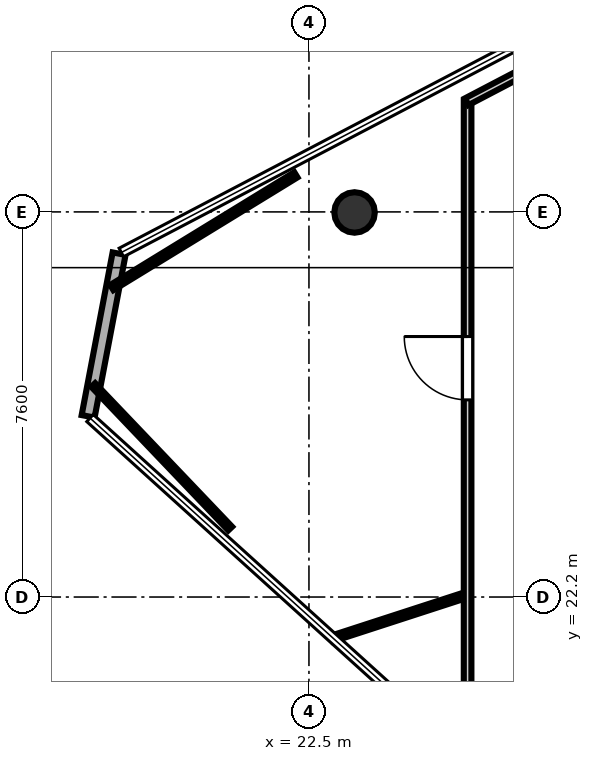
"""IFC4 building model, lengths in metres.
Left out: names, types, materials, properties, quantities, classifications, styles, units other than length and angle.
Written with IfcOpenShell. Run it as: python <this file> out.ifc"""

import sys

from ifc_helpers import new_model, si_unit, direction, frame, frame_2d, origin, origin_2d, place, context, subcontext, project, spatial, rectangle, hollow_circle, extrude, element, fill, save


model = new_model("IFC4")
c1 = context("Model", 3, precision=1e-05, world=origin(), true_north=direction((0.0, 1.0)))
c2 = subcontext(c1, "Body", "Model", "MODEL_VIEW")
j1 = project(units=[si_unit("LENGTHUNIT", "METRE"), si_unit("PLANEANGLEUNIT", "RADIAN")], contexts=[c1])
p1 = place(None, origin())
s1 = spatial("IfcSite", under=j1, at=p1, CompositionType="ELEMENT")
p2 = place(p1, origin())
s2 = spatial("IfcBuilding", under=s1, at=p2, CompositionType="ELEMENT")
p3 = place(p2, frame((0.0, 0.0, 351.8)))
s3 = spatial("IfcBuildingStorey", under=s2, at=p3, CompositionType="ELEMENT", Elevation=351.8)
p4 = place(p3, frame((23.4, 29.789, 0.0), z_axis=(0.0, 0.0, 1.0), x_axis=(1.0, 0.0, 0.0)))
e1 = element("IfcColumn", 1, at=p4, inside=s3, PredefinedType="COLUMN", context=c2, shape_type="SweptSolid", body=[
    extrude(hollow_circle(Radius=0.4, WallThickness=0.022, at=origin_2d()), origin(), (0.0, 0.0, 1.0), 4.5),
])
p5 = place(p3, frame((18.753, 28.976, 0.0), z_axis=(0.0, 0.0, 1.0), x_axis=(-0.186926716853, -0.982373860873, 0.0)))
e2 = element("IfcWall", 2, at=p5, inside=s3, PredefinedType="SOLIDWALL", context=c2, shape_type="SweptSolid", body=[
    extrude(rectangle(XDim=3.268, YDim=0.26, at=frame_2d((1.634, 0.0))), origin(), (0.0, 0.0, 1.0), 4.3),
])
p6 = place(p3, frame((25.631, 19.68, 0.0), z_axis=(0.0, 0.0, 1.0), x_axis=(0.0, 1.0, 0.0)))
e3 = element("IfcWall", 3, at=p6, inside=s3, PredefinedType="PARTITIONING", context=c2, shape_type="SweptSolid", body=[
    extrude(rectangle(XDim=12.322, YDim=0.15, at=frame_2d((6.161, 0.0))), origin(), (0.0, 0.0, 1.0), 2.82),
])
p7 = place(p6, frame((6.41, 0.0, 0.0)))
e4 = element("IfcOpeningElement", 4, at=p7, cuts=e3, PredefinedType="OPENING", context=c2, shape_type="SweptSolid", body=[
    extrude(rectangle(XDim=1.25, YDim=2.2, at=frame_2d((0.625, 1.1))), frame((0.0, 0.085, 0.0), z_axis=(0.0, -1.0, 0.0), x_axis=(1.0, 0.0, 0.0)), (0.0, 0.0, 1.0), 0.17),
])
p8 = place(p3, frame((25.615, 31.975, 0.0), z_axis=(0.0, 0.0, 1.0), x_axis=(0.885882957488, 0.463908811763, 0.0)))
e5 = element("IfcWall", 5, at=p8, inside=s3, PredefinedType="PARTITIONING", context=c2, shape_type="SweptSolid", body=[
    extrude(rectangle(XDim=2.323, YDim=0.15, at=frame_2d((1.162, 0.0))), origin(), (0.0, 0.0, 1.0), 2.82),
])
p9 = place(p3, frame((25.51, 22.21, 0.0), z_axis=(0.0, 0.0, 1.0), x_axis=(-0.951084194761, -0.308931795831, 0.0)))
e6 = element("IfcWall", 6, at=p9, inside=s3, PredefinedType="PARTITIONING", context=c2, shape_type="SweptSolid", body=[
    extrude(rectangle(XDim=2.684, YDim=0.12, at=frame_2d((1.342, 0.0))), origin(), (0.0, 0.0, 1.0), 2.82),
])
p10 = place(p3, frame((20.946, 23.551, 0.0), z_axis=(0.0, 0.0, 1.0), x_axis=(-0.690268168464, 0.723553630082, 0.0)))
e7 = element("IfcWall", 7, at=p10, inside=s3, PredefinedType="PARTITIONING", context=c2, shape_type="SweptSolid", body=[
    extrude(rectangle(XDim=3.917, YDim=0.105, at=frame_2d((1.958, 0.0))), origin(), (0.0, 0.0, 1.0), 2.82),
])
p11 = place(p3, frame((18.61, 28.307, 0.0), z_axis=(0.0, 0.0, 1.0), x_axis=(0.852738779299, 0.522337605654, 0.0)))
e8 = element("IfcWall", 8, at=p11, inside=s3, PredefinedType="PARTITIONING", context=c2, shape_type="SweptSolid", body=[
    extrude(rectangle(XDim=4.26, YDim=0.12, at=frame_2d((2.13, 0.0))), origin(), (0.0, 0.0, 1.0), 2.82),
])
p12 = place(p7, origin())
e9 = element("IfcDoor", 9, at=p12, inside=s3, OperationType="SINGLE_SWING_RIGHT", PredefinedType="DOOR", context=c2, shape_type="SweptSolid", body=[
    extrude(rectangle(XDim=1.25, YDim=2.2, at=frame_2d((0.625, 1.1))), frame((0.0, 0.025, 0.0), z_axis=(0.0, -1.0, 0.0), x_axis=(1.0, 0.0, 0.0)), (0.0, 0.0, 1.0), 0.05),
])
fill(e4, e9)
save(model, sys.argv[1])
